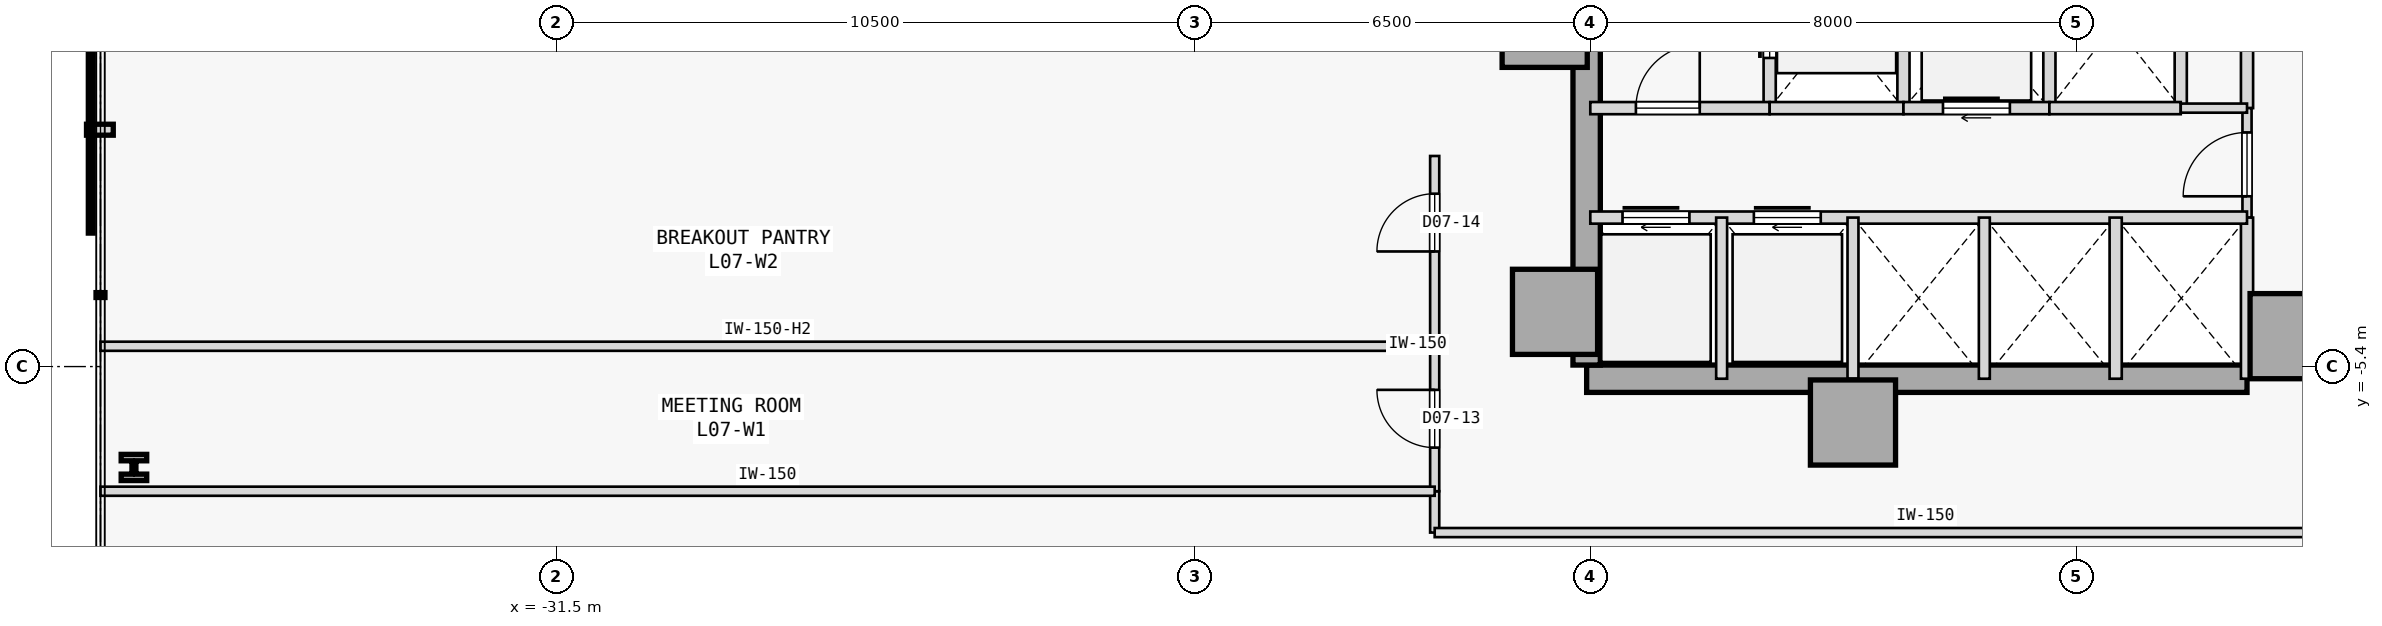
"""IFC4 building model, lengths in metres.
Left out: names, types, materials, properties, quantities, classifications, styles, units other than length and angle.
Written with IfcOpenShell. Run it as: python <this file> out.ifc"""

import sys

from ifc_helpers import new_model, si_unit, direction, frame, frame_2d, origin, origin_2d, place, context, subcontext, project, spatial, rectangle, i_section, extrude, element, fill, save


model = new_model("IFC4")
c1 = context("Model", 3, precision=1e-05, world=origin(), true_north=direction((0.0, 1.0)))
c2 = subcontext(c1, "Body", "Model", "MODEL_VIEW")
j1 = project(units=[si_unit("LENGTHUNIT", "METRE"), si_unit("PLANEANGLEUNIT", "RADIAN")], contexts=[c1])
p1 = place(None, origin())
s1 = spatial("IfcSite", under=j1, at=p1, CompositionType="ELEMENT")
p2 = place(p1, origin())
s2 = spatial("IfcBuilding", under=s1, at=p2, CompositionType="ELEMENT")
p3 = place(p2, frame((0.0, 0.0, 33.2)))
s3 = spatial("IfcBuildingStorey", under=s2, at=p3, CompositionType="ELEMENT", Elevation=33.2)
for number, where, z_axis, x_axis in (
    (1, (-15.25, 0.22, 0.0), (0.0, 0.0, 1.0), (1.0, 0.0, 0.0)),
    (2, (-15.08, -4.5, 0.0), (0.0, 0.0, 1.0), (1.0, 0.0, 0.0)),
    (3, (-10.18, -6.32, 0.0), (0.0, 0.0, 1.0), (1.0, 0.0, 0.0)),
    (4, (-2.95, -4.9, 0.0), (0.0, 0.0, 1.0), (1.0, 0.0, 0.0)),
):
    element("IfcColumn", number, at=place(p3, frame(where, z_axis=z_axis, x_axis=x_axis)), inside=s3, PredefinedType="COLUMN", context=c2, shape_type="SweptSolid", body=[
        extrude(rectangle(XDim=1.4, YDim=1.4, at=origin_2d()), origin(), (0.0, 0.0, 1.0), 3.8),
    ])
p4 = place(p3, frame((-14.56, -5.6, 0.0), z_axis=(0.0, 0.0, 1.0), x_axis=(1.0, 0.0, 0.0)))
e5 = element("IfcWall", 5, at=p4, inside=s3, PredefinedType="SHEAR", context=c2, shape_type="SweptSolid", body=[
    extrude(rectangle(XDim=10.86, YDim=0.45, at=frame_2d((5.43, 0.0))), origin(), (0.0, 0.0, 1.0), 3.575),
])
p5 = place(p3, frame((-14.56, -5.375, 0.0), z_axis=(0.0, 0.0, 1.0), x_axis=(0.0, 1.0, 0.0)))
e6 = element("IfcWall", 6, at=p5, inside=s3, PredefinedType="SHEAR", context=c2, shape_type="SweptSolid", body=[
    extrude(rectangle(XDim=10.75, YDim=0.45, at=frame_2d((5.375, 0.0))), origin(), (0.0, 0.0, 1.0), 3.575),
])
p6 = place(p3, frame((-38.45, -7.059, 0.0), z_axis=(0.0, 0.0, 1.0), x_axis=(1.0, 0.0, 0.0)))
e7 = element("IfcColumn", 7, at=p6, inside=s3, PredefinedType="COLUMN", context=c2, shape_type="SweptSolid", body=[
    extrude(i_section(OverallWidth=0.42, OverallDepth=0.431, WebThickness=0.065, FlangeThickness=0.106, FilletRadius=0.015, at=origin_2d()), origin(), (0.0, 0.0, 1.0), 3.8),
])
p7 = place(p3, frame((-3.7, -1.15, 0.0), z_axis=(0.0, 0.0, 1.0), x_axis=(0.0, 1.0, 0.0)))
e8 = element("IfcWall", 8, at=p7, inside=s3, PredefinedType="STANDARD", context=c2, shape_type="SweptSolid", body=[
    extrude(rectangle(XDim=6.75, YDim=0.2, at=frame_2d((3.375, 0.0))), origin(), (0.0, 0.0, 1.0), 3.575),
])
p8 = place(p7, frame((1.1, 0.0, 0.0)))
e9 = element("IfcOpeningElement", 9, at=p8, cuts=e8, PredefinedType="OPENING", context=c2, shape_type="SweptSolid", body=[
    extrude(rectangle(XDim=0.9, YDim=2.15, at=frame_2d((0.45, 1.075))), frame((0.0, 0.11, 0.0), z_axis=(0.0, -1.0, 0.0), x_axis=(1.0, 0.0, 0.0)), (0.0, 0.0, 1.0), 0.22),
])
p9 = place(p7, frame((4.0, 0.0, 0.0)))
e10 = element("IfcOpeningElement", 10, at=p9, cuts=e8, PredefinedType="OPENING", context=c2, shape_type="SweptSolid", body=[
    extrude(rectangle(XDim=0.92, YDim=2.15, at=frame_2d((0.46, 1.075))), frame((0.0, 0.11, 0.0), z_axis=(0.0, -1.0, 0.0), x_axis=(1.0, 0.0, 0.0)), (0.0, 0.0, 1.0), 0.22),
])
p10 = place(p3, frame((-3.7, -2.95, 0.0), z_axis=(0.0, 0.0, 1.0), x_axis=(0.0, 1.0, 0.0)))
e11 = element("IfcWall", 11, at=p10, inside=s3, PredefinedType="PARTITIONING", context=c2, shape_type="SweptSolid", body=[
    extrude(rectangle(XDim=1.8, YDim=0.15, at=frame_2d((0.9, 0.0))), origin(), (0.0, 0.0, 1.0), 3.575),
])
p11 = place(p10, frame((0.35, 0.0, 0.0)))
e12 = element("IfcOpeningElement", 12, at=p11, cuts=e11, PredefinedType="OPENING", context=c2, shape_type="SweptSolid", body=[
    extrude(rectangle(XDim=1.05, YDim=2.18, at=frame_2d((0.525, 1.09))), frame((0.0, 0.085, 0.0), z_axis=(0.0, -1.0, 0.0), x_axis=(1.0, 0.0, 0.0)), (0.0, 0.0, 1.0), 0.17),
])
p12 = place(p3, frame((-3.7, -5.6, 0.0), z_axis=(0.0, 0.0, 1.0), x_axis=(0.0, 1.0, 0.0)))
e13 = element("IfcWall", 13, at=p12, inside=s3, PredefinedType="STANDARD", context=c2, shape_type="SweptSolid", body=[
    extrude(rectangle(XDim=2.65, YDim=0.2, at=frame_2d((1.325, 0.0))), origin(), (0.0, 0.0, 1.0), 3.575),
])
p13 = place(p3, frame((-11.55, -1.15, 0.0), z_axis=(0.0, 0.0, 1.0), x_axis=(0.0, 1.0, 0.0)))
e14 = element("IfcWall", 14, at=p13, inside=s3, PredefinedType="STANDARD", context=c2, shape_type="SweptSolid", body=[
    extrude(rectangle(XDim=2.75, YDim=0.2, at=frame_2d((1.375, 0.0))), origin(), (0.0, 0.0, 1.0), 3.575),
])
p14 = place(p13, frame((0.825, 0.0, 0.0)))
e15 = element("IfcOpeningElement", 15, at=p14, cuts=e14, PredefinedType="OPENING", context=c2, shape_type="SweptSolid", body=[
    extrude(rectangle(XDim=1.1, YDim=2.15, at=frame_2d((0.55, 1.075))), frame((0.0, 0.11, 0.0), z_axis=(0.0, -1.0, 0.0), x_axis=(1.0, 0.0, 0.0)), (0.0, 0.0, 1.0), 0.22),
])
p15 = place(p3, frame((-9.35, -1.15, 0.0), z_axis=(0.0, 0.0, 1.0), x_axis=(0.0, 1.0, 0.0)))
e16 = element("IfcWall", 16, at=p15, inside=s3, PredefinedType="STANDARD", context=c2, shape_type="SweptSolid", body=[
    extrude(rectangle(XDim=2.75, YDim=0.2, at=frame_2d((1.375, 0.0))), origin(), (0.0, 0.0, 1.0), 3.575),
])
p16 = place(p3, frame((-14.5, -1.15, 0.0), z_axis=(0.0, 0.0, 1.0), x_axis=(1.0, 0.0, 0.0)))
e17 = element("IfcWall", 17, at=p16, inside=s3, PredefinedType="STANDARD", context=c2, shape_type="SweptSolid", body=[
    extrude(rectangle(XDim=2.95, YDim=0.2, at=frame_2d((1.475, 0.0))), origin(), (0.0, 0.0, 1.0), 3.575),
])
p17 = place(p16, frame((0.75, 0.0, 0.0)))
e18 = element("IfcOpeningElement", 18, at=p17, cuts=e17, PredefinedType="OPENING", context=c2, shape_type="SweptSolid", body=[
    extrude(rectangle(XDim=1.05, YDim=2.18, at=frame_2d((0.525, 1.09))), frame((0.0, 0.11, 0.0), z_axis=(0.0, -1.0, 0.0), x_axis=(1.0, 0.0, 0.0)), (0.0, 0.0, 1.0), 0.22),
])
p18 = place(p3, frame((-11.55, -1.15, 0.0), z_axis=(0.0, 0.0, 1.0), x_axis=(1.0, 0.0, 0.0)))
e19 = element("IfcWall", 19, at=p18, inside=s3, PredefinedType="STANDARD", context=c2, shape_type="SweptSolid", body=[
    extrude(rectangle(XDim=2.2, YDim=0.2, at=frame_2d((1.1, 0.0))), origin(), (0.0, 0.0, 1.0), 3.575),
])
p19 = place(p3, frame((-6.95, -1.15, 0.0), z_axis=(0.0, 0.0, 1.0), x_axis=(0.0, 1.0, 0.0)))
e20 = element("IfcWall", 20, at=p19, inside=s3, PredefinedType="STANDARD", context=c2, shape_type="SweptSolid", body=[
    extrude(rectangle(XDim=2.75, YDim=0.2, at=frame_2d((1.375, 0.0))), origin(), (0.0, 0.0, 1.0), 3.575),
])
p20 = place(p3, frame((-9.35, -1.15, 0.0), z_axis=(0.0, 0.0, 1.0), x_axis=(1.0, 0.0, 0.0)))
e21 = element("IfcWall", 21, at=p20, inside=s3, PredefinedType="STANDARD", context=c2, shape_type="SweptSolid", body=[
    extrude(rectangle(XDim=2.4, YDim=0.2, at=frame_2d((1.2, 0.0))), origin(), (0.0, 0.0, 1.0), 3.575),
])
p21 = place(p20, frame((0.65, 0.0, 0.0)))
e22 = element("IfcOpeningElement", 22, at=p21, cuts=e21, PredefinedType="OPENING", context=c2, shape_type="SweptSolid", body=[
    extrude(rectangle(XDim=1.1, YDim=2.15, at=frame_2d((0.55, 1.075))), frame((0.0, 0.11, 0.0), z_axis=(0.0, -1.0, 0.0), x_axis=(1.0, 0.0, 0.0)), (0.0, 0.0, 1.0), 0.22),
])
p22 = place(p3, frame((-4.79, -1.15, 0.0), z_axis=(0.0, 0.0, 1.0), x_axis=(0.0, 1.0, 0.0)))
e23 = element("IfcWall", 23, at=p22, inside=s3, PredefinedType="STANDARD", context=c2, shape_type="SweptSolid", body=[
    extrude(rectangle(XDim=2.75, YDim=0.2, at=frame_2d((1.375, 0.0))), origin(), (0.0, 0.0, 1.0), 3.575),
])
p23 = place(p3, frame((-6.95, -1.15, 0.0), z_axis=(0.0, 0.0, 1.0), x_axis=(1.0, 0.0, 0.0)))
e24 = element("IfcWall", 24, at=p23, inside=s3, PredefinedType="STANDARD", context=c2, shape_type="SweptSolid", body=[
    extrude(rectangle(XDim=2.16, YDim=0.2, at=frame_2d((1.08, 0.0))), origin(), (0.0, 0.0, 1.0), 3.575),
])
p24 = place(p3, frame((-4.79, -1.15, 0.0), z_axis=(0.0, 0.0, 1.0), x_axis=(1.0, 0.0, 0.0)))
e25 = element("IfcWall", 25, at=p24, inside=s3, PredefinedType="PARTITIONING", context=c2, shape_type="SweptSolid", body=[
    extrude(rectangle(XDim=1.09, YDim=0.15, at=frame_2d((0.545, 0.0))), origin(), (0.0, 0.0, 1.0), 3.575),
])
p25 = place(p3, frame((-14.5, -2.95, 0.0), z_axis=(0.0, 0.0, 1.0), x_axis=(1.0, 0.0, 0.0)))
e26 = element("IfcWall", 26, at=p25, inside=s3, PredefinedType="STANDARD", context=c2, shape_type="SweptSolid", body=[
    extrude(rectangle(XDim=10.8, YDim=0.2, at=frame_2d((5.4, 0.0))), origin(), (0.0, 0.0, 1.0), 3.575),
])
p26 = place(p25, frame((0.53, 0.0, 0.0)))
e27 = element("IfcOpeningElement", 27, at=p26, cuts=e26, PredefinedType="OPENING", context=c2, shape_type="SweptSolid", body=[
    extrude(rectangle(XDim=1.1, YDim=2.15, at=frame_2d((0.55, 1.075))), frame((0.0, 0.11, 0.0), z_axis=(0.0, -1.0, 0.0), x_axis=(1.0, 0.0, 0.0)), (0.0, 0.0, 1.0), 0.22),
])
p27 = place(p25, frame((2.69, 0.0, 0.0)))
e28 = element("IfcOpeningElement", 28, at=p27, cuts=e26, PredefinedType="OPENING", context=c2, shape_type="SweptSolid", body=[
    extrude(rectangle(XDim=1.1, YDim=2.15, at=frame_2d((0.55, 1.075))), frame((0.0, 0.11, 0.0), z_axis=(0.0, -1.0, 0.0), x_axis=(1.0, 0.0, 0.0)), (0.0, 0.0, 1.0), 0.22),
])
p28 = place(p3, frame((-5.86, -5.6, 0.0), z_axis=(0.0, 0.0, 1.0), x_axis=(0.0, 1.0, 0.0)))
e29 = element("IfcWall", 29, at=p28, inside=s3, PredefinedType="STANDARD", context=c2, shape_type="SweptSolid", body=[
    extrude(rectangle(XDim=2.65, YDim=0.2, at=frame_2d((1.325, 0.0))), origin(), (0.0, 0.0, 1.0), 3.575),
])
for number, where, z_axis, x_axis in (
    (30, (-12.34, -5.6, 0.0), (0.0, 0.0, 1.0), (0.0, 1.0, 0.0)),
    (31, (-10.18, -5.6, 0.0), (0.0, 0.0, 1.0), (0.0, 1.0, 0.0)),
    (32, (-8.02, -5.6, 0.0), (0.0, 0.0, 1.0), (0.0, 1.0, 0.0)),
):
    element("IfcWall", number, at=place(p3, frame(where, z_axis=z_axis, x_axis=x_axis)), inside=s3, PredefinedType="STANDARD", context=c2, shape_type="SweptSolid", body=[
        extrude(rectangle(XDim=2.65, YDim=0.18, at=frame_2d((1.325, 0.0))), origin(), (0.0, 0.0, 1.0), 3.575),
    ])
p29 = place(p3, frame((-17.059, -8.13, 0.0), z_axis=(0.0, 0.0, 1.0), x_axis=(0.0, 1.0, 0.0)))
e33 = element("IfcWall", 33, at=p29, inside=s3, PredefinedType="PARTITIONING", context=c2, shape_type="SweptSolid", body=[
    extrude(rectangle(XDim=0.68, YDim=0.15, at=frame_2d((0.34, 0.0))), origin(), (0.0, 0.0, 1.0), 3.575),
])
p30 = place(p3, frame((-17.059, -8.13, 0.0), z_axis=(0.0, 0.0, 1.0), x_axis=(1.0, 0.0, 0.0)))
e34 = element("IfcWall", 34, at=p30, inside=s3, PredefinedType="PARTITIONING", context=c2, shape_type="SweptSolid", body=[
    extrude(rectangle(XDim=16.139, YDim=0.15, at=frame_2d((8.07, 0.0))), origin(), (0.0, 0.0, 1.0), 3.575),
])
p31 = place(p3, frame((-17.059, -7.45, 0.0), z_axis=(0.0, 0.0, 1.0), x_axis=(0.0, 1.0, 0.0)))
e35 = element("IfcWall", 35, at=p31, inside=s3, PredefinedType="PARTITIONING", context=c2, shape_type="SweptSolid", body=[
    extrude(rectangle(XDim=2.384, YDim=0.15, at=frame_2d((1.192, 0.0))), origin(), (0.0, 0.0, 1.0), 3.575),
])
p32 = place(p31, frame((0.717, 0.0, 0.0)))
e36 = element("IfcOpeningElement", 36, at=p32, cuts=e35, PredefinedType="OPENING", context=c2, shape_type="SweptSolid", body=[
    extrude(rectangle(XDim=0.95, YDim=2.15, at=frame_2d((0.475, 1.075))), frame((0.0, 0.085, 0.0), z_axis=(0.0, -1.0, 0.0), x_axis=(1.0, 0.0, 0.0)), (0.0, 0.0, 1.0), 0.17),
])
p33 = place(p3, frame((-17.059, -5.066, 0.0), z_axis=(0.0, 0.0, 1.0), x_axis=(0.0, 1.0, 0.0)))
e37 = element("IfcWall", 37, at=p33, inside=s3, PredefinedType="PARTITIONING", context=c2, shape_type="SweptSolid", body=[
    extrude(rectangle(XDim=3.129, YDim=0.15, at=frame_2d((1.564, 0.0))), origin(), (0.0, 0.0, 1.0), 3.575),
])
p34 = place(p33, frame((1.559, 0.0, 0.0)))
e38 = element("IfcOpeningElement", 38, at=p34, cuts=e37, PredefinedType="OPENING", context=c2, shape_type="SweptSolid", body=[
    extrude(rectangle(XDim=0.95, YDim=2.15, at=frame_2d((0.475, 1.075))), frame((0.0, 0.085, 0.0), z_axis=(0.0, -1.0, 0.0), x_axis=(1.0, 0.0, 0.0)), (0.0, 0.0, 1.0), 0.17),
])
p35 = place(p3, frame((-39.0, -7.45, 0.0), z_axis=(0.0, 0.0, 1.0), x_axis=(1.0, 0.0, 0.0)))
e39 = element("IfcWall", 39, at=p35, inside=s3, PredefinedType="PARTITIONING", context=c2, shape_type="SweptSolid", body=[
    extrude(rectangle(XDim=21.941, YDim=0.15, at=frame_2d((10.97, 0.0))), origin(), (0.0, 0.0, 1.0), 3.575),
])
p36 = place(p3, frame((-39.0, -5.066, 0.0), z_axis=(0.0, 0.0, 1.0), x_axis=(1.0, 0.0, 0.0)))
e40 = element("IfcWall", 40, at=p36, inside=s3, PredefinedType="PARTITIONING", context=c2, shape_type="SweptSolid", body=[
    extrude(rectangle(XDim=21.941, YDim=0.15, at=frame_2d((10.97, 0.0))), origin(), (0.0, 0.0, 1.0), 2.975),
])
p37 = place(p17, origin())
e41 = element("IfcDoor", 41, at=p37, inside=s3, OperationType="SINGLE_SWING_RIGHT", PredefinedType="DOOR", context=c2, shape_type="SweptSolid", body=[
    extrude(rectangle(XDim=1.05, YDim=2.18, at=frame_2d((0.525, 1.09))), frame((0.0, 0.025, 0.0), z_axis=(0.0, -1.0, 0.0), x_axis=(1.0, 0.0, 0.0)), (0.0, 0.0, 1.0), 0.05),
])
fill(e18, e41)
p38 = place(p11, origin())
e42 = element("IfcDoor", 42, at=p38, inside=s3, OperationType="SINGLE_SWING_LEFT", PredefinedType="DOOR", context=c2, shape_type="SweptSolid", body=[
    extrude(rectangle(XDim=1.05, YDim=2.18, at=frame_2d((0.525, 1.09))), frame((0.0, 0.025, 0.0), z_axis=(0.0, -1.0, 0.0), x_axis=(1.0, 0.0, 0.0)), (0.0, 0.0, 1.0), 0.05),
])
fill(e12, e42)
p39 = place(p14, origin())
e43 = element("IfcDoor", 43, at=p39, inside=s3, OperationType="SLIDING_TO_RIGHT", PredefinedType="DOOR", context=c2, shape_type="SweptSolid", body=[
    extrude(rectangle(XDim=1.1, YDim=2.15, at=frame_2d((0.55, 1.075))), frame((0.0, 0.025, 0.0), z_axis=(0.0, -1.0, 0.0), x_axis=(1.0, 0.0, 0.0)), (0.0, 0.0, 1.0), 0.05),
])
fill(e15, e43)
p40 = place(p21, origin())
e44 = element("IfcDoor", 44, at=p40, inside=s3, OperationType="SLIDING_TO_RIGHT", PredefinedType="DOOR", context=c2, shape_type="SweptSolid", body=[
    extrude(rectangle(XDim=1.1, YDim=2.15, at=frame_2d((0.55, 1.075))), frame((0.0, 0.025, 0.0), z_axis=(0.0, -1.0, 0.0), x_axis=(1.0, 0.0, 0.0)), (0.0, 0.0, 1.0), 0.05),
])
fill(e22, e44)
p41 = place(p26, origin())
e45 = element("IfcDoor", 45, at=p41, inside=s3, OperationType="SLIDING_TO_RIGHT", PredefinedType="DOOR", context=c2, shape_type="SweptSolid", body=[
    extrude(rectangle(XDim=1.1, YDim=2.15, at=frame_2d((0.55, 1.075))), frame((0.0, 0.025, 0.0), z_axis=(0.0, -1.0, 0.0), x_axis=(1.0, 0.0, 0.0)), (0.0, 0.0, 1.0), 0.05),
])
fill(e27, e45)
p42 = place(p27, origin())
e46 = element("IfcDoor", 46, at=p42, inside=s3, OperationType="SLIDING_TO_RIGHT", PredefinedType="DOOR", context=c2, shape_type="SweptSolid", body=[
    extrude(rectangle(XDim=1.1, YDim=2.15, at=frame_2d((0.55, 1.075))), frame((0.0, 0.025, 0.0), z_axis=(0.0, -1.0, 0.0), x_axis=(1.0, 0.0, 0.0)), (0.0, 0.0, 1.0), 0.05),
])
fill(e28, e46)
p43 = place(p32, origin())
e47 = element("IfcDoor", 47, at=p43, inside=s3, OperationType="SINGLE_SWING_RIGHT", PredefinedType="DOOR", context=c2, shape_type="SweptSolid", body=[
    extrude(rectangle(XDim=0.95, YDim=2.15, at=frame_2d((0.475, 1.075))), frame((0.0, 0.025, 0.0), z_axis=(0.0, -1.0, 0.0), x_axis=(1.0, 0.0, 0.0)), (0.0, 0.0, 1.0), 0.05),
])
fill(e36, e47)
p44 = place(p34, origin())
e48 = element("IfcDoor", 48, at=p44, inside=s3, OperationType="SINGLE_SWING_LEFT", PredefinedType="DOOR", context=c2, shape_type="SweptSolid", body=[
    extrude(rectangle(XDim=0.95, YDim=2.15, at=frame_2d((0.475, 1.075))), frame((0.0, 0.025, 0.0), z_axis=(0.0, -1.0, 0.0), x_axis=(1.0, 0.0, 0.0)), (0.0, 0.0, 1.0), 0.05),
])
fill(e38, e48)
save(model, sys.argv[1])
